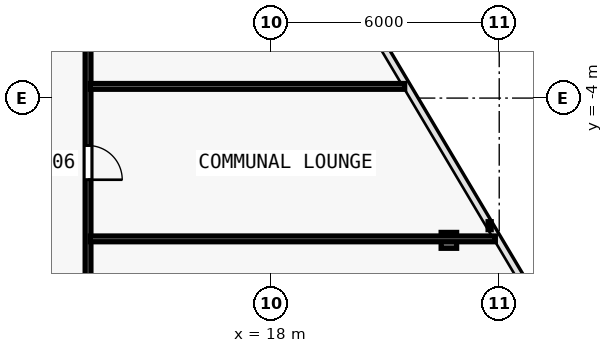
"""IFC4 building model, lengths in metres.
Left out: names, types, materials, properties, quantities, classifications, styles, units other than length and angle.
Written with IfcOpenShell. Run it as: python <this file> out.ifc"""

import sys

from ifc_helpers import new_model, si_unit, direction, frame, frame_2d, origin, origin_2d, place, context, subcontext, project, spatial, rectangle, i_section, extrude, element, fill, save


model = new_model("IFC4")
c1 = context("Model", 3, precision=1e-05, world=origin(), true_north=direction((0.0, 1.0)))
c2 = subcontext(c1, "Body", "Model", "MODEL_VIEW")
j1 = project(units=[si_unit("LENGTHUNIT", "METRE"), si_unit("PLANEANGLEUNIT", "RADIAN")], contexts=[c1])
p1 = place(None, origin())
s1 = spatial("IfcSite", under=j1, at=p1, CompositionType="ELEMENT")
p2 = place(p1, origin())
s2 = spatial("IfcBuilding", under=s1, at=p2, CompositionType="ELEMENT")
p3 = place(p2, frame((0.0, 0.0, 125.7)))
s3 = spatial("IfcBuildingStorey", under=s2, at=p3, CompositionType="ELEMENT", Elevation=125.7)
p4 = place(p3, frame((22.676, -7.743, 0.006), z_axis=(-0.026107436898, 0.021620221181, 0.999425318758), x_axis=(-0.637813971185, -0.770190455771, 0.0)))
e1 = element("IfcColumn", 1, at=p4, inside=s3, PredefinedType="COLUMN", context=c2, shape_type="SweptSolid", body=[
    extrude(i_section(OverallWidth=0.406, OverallDepth=0.416, WebThickness=0.019, FlangeThickness=0.031, FilletRadius=0.015, at=origin_2d()), origin(), (0.0, 0.0, 1.0), 3.591),
])
p5 = place(p3, frame((13.18, 8.444, 0.0), z_axis=(0.0, 0.0, 1.0), x_axis=(0.0, -1.0, 0.0)))
e2 = element("IfcWall", 2, at=p5, inside=s3, PredefinedType="PARTITIONING", context=c2, shape_type="SweptSolid", body=[
    extrude(rectangle(XDim=20.004, YDim=0.15, at=frame_2d((10.002, 0.0))), origin(), (0.0, 0.0, 1.0), 2.635),
])
p6 = place(p5, frame((13.692, 0.0, 0.0)))
e3 = element("IfcOpeningElement", 3, at=p6, cuts=e2, PredefinedType="OPENING", context=c2, shape_type="SweptSolid", body=[
    extrude(rectangle(XDim=0.9, YDim=2.1, at=frame_2d((0.45, 1.05))), frame((0.0, 0.085, 0.0), z_axis=(0.0, -1.0, 0.0), x_axis=(1.0, 0.0, 0.0)), (0.0, 0.0, 1.0), 0.17),
])
p7 = place(p5, frame((9.68, 0.0, 0.0)))
e4 = element("IfcOpeningElement", 4, at=p7, cuts=e2, PredefinedType="OPENING", context=c2, shape_type="SweptSolid", body=[
    extrude(rectangle(XDim=0.9, YDim=2.1, at=frame_2d((0.45, 1.05))), frame((0.0, 0.085, 0.0), z_axis=(0.0, -1.0, 0.0), x_axis=(1.0, 0.0, 0.0)), (0.0, 0.0, 1.0), 0.17),
])
p8 = place(p5, frame((3.701, 0.0, 0.0)))
e5 = element("IfcOpeningElement", 5, at=p8, cuts=e2, PredefinedType="OPENING", context=c2, shape_type="SweptSolid", body=[
    extrude(rectangle(XDim=0.9, YDim=2.1, at=frame_2d((0.45, 1.05))), frame((0.0, 0.085, 0.0), z_axis=(0.0, -1.0, 0.0), x_axis=(1.0, 0.0, 0.0)), (0.0, 0.0, 1.0), 0.17),
])
p9 = place(p3, frame((13.24, -7.705, 0.0), z_axis=(0.0, 0.0, 1.0), x_axis=(1.0, 0.0, 0.0)))
e6 = element("IfcWall", 6, at=p9, inside=s3, PredefinedType="PARTITIONING", context=c2, shape_type="SweptSolid", body=[
    extrude(rectangle(XDim=10.657, YDim=0.15, at=frame_2d((5.328, 0.0))), origin(), (0.0, 0.0, 1.0), 2.635),
])
p10 = place(p3, frame((13.24, -3.692, 0.0), z_axis=(0.0, 0.0, 1.0), x_axis=(1.0, 0.0, 0.0)))
e7 = element("IfcWall", 7, at=p10, inside=s3, PredefinedType="PARTITIONING", context=c2, shape_type="SweptSolid", body=[
    extrude(rectangle(XDim=8.271, YDim=0.15, at=frame_2d((4.135, 0.0))), origin(), (0.0, 0.0, 1.0), 2.805),
])
p11 = place(p6, origin())
e8 = element("IfcDoor", 8, at=p11, inside=s3, OperationType="SINGLE_SWING_RIGHT", PredefinedType="DOOR", context=c2, shape_type="SweptSolid", body=[
    extrude(rectangle(XDim=0.9, YDim=2.1, at=frame_2d((0.45, 1.05))), frame((0.0, 0.025, 0.0), z_axis=(0.0, -1.0, 0.0), x_axis=(1.0, 0.0, 0.0)), (0.0, 0.0, 1.0), 0.05),
])
fill(e3, e8)
save(model, sys.argv[1])
